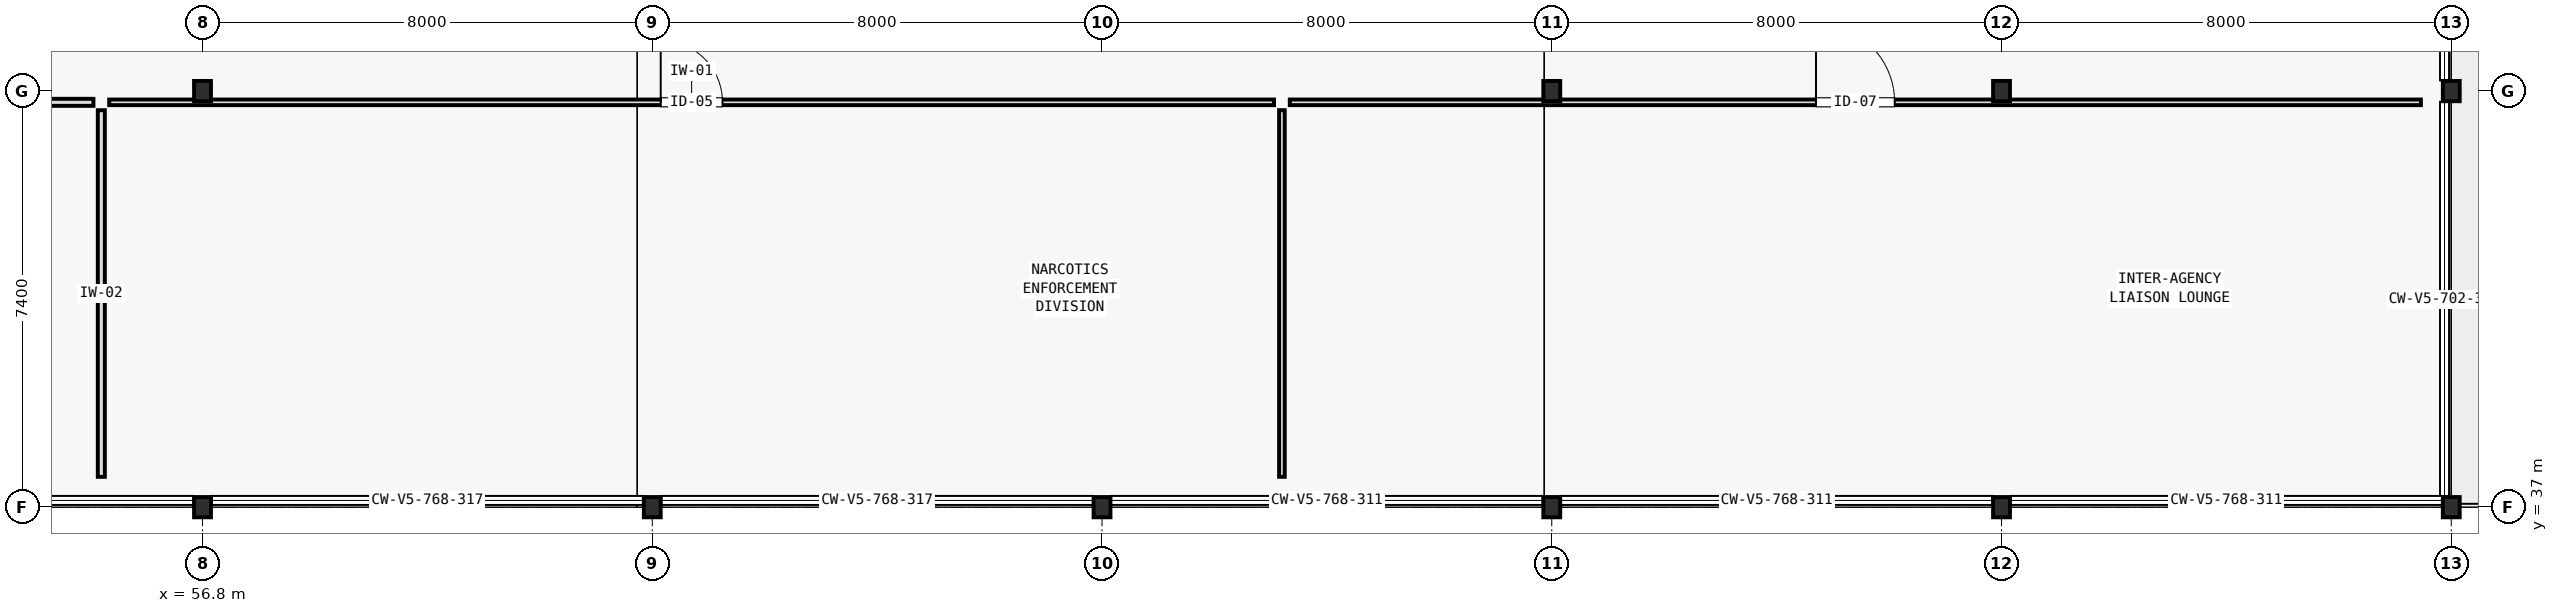
"""IFC4 building model, lengths in metres.
Left out: names, types, materials, properties, quantities, classifications, styles, units other than length and angle.
Written with IfcOpenShell. Run it as: python <this file> out.ifc"""

import sys

from ifc_helpers import new_model, si_unit, direction, frame, frame_2d, origin, origin_2d, place, context, subcontext, project, spatial, rectangle, i_section, extrude, element, fill, save


model = new_model("IFC4")
c1 = context("Model", 3, precision=1e-05, world=origin(), true_north=direction((0.0, 1.0)))
c2 = subcontext(c1, "Body", "Model", "MODEL_VIEW")
j1 = project(units=[si_unit("LENGTHUNIT", "METRE"), si_unit("PLANEANGLEUNIT", "RADIAN")], contexts=[c1])
p1 = place(None, origin())
s1 = spatial("IfcSite", under=j1, at=p1, CompositionType="ELEMENT")
p2 = place(p1, origin())
s2 = spatial("IfcBuilding", under=s1, at=p2, CompositionType="ELEMENT")
p3 = place(p2, frame((0.0, 0.0, 23.3)))
s3 = spatial("IfcBuildingStorey", under=s2, at=p3, CompositionType="ELEMENT", Elevation=23.3)
for number, where, z_axis, x_axis in (
    (1, (56.8, 37.0, 0.0), (0.0, 0.0, 1.0), (1.0, 0.0, 0.0)),
    (2, (56.8, 44.4, 0.0), (0.0, 0.0, 1.0), (1.0, 0.0, 0.0)),
    (3, (64.8, 37.0, 0.0), (0.0, 0.0, 1.0), (1.0, 0.0, 0.0)),
    (4, (72.8, 37.0, 0.0), (0.0, 0.0, 1.0), (1.0, 0.0, 0.0)),
    (5, (80.8, 37.0, 0.0), (0.0, 0.0, 1.0), (1.0, 0.0, 0.0)),
    (6, (80.8, 44.4, 0.0), (0.0, 0.0, 1.0), (1.0, 0.0, 0.0)),
    (7, (88.8, 37.0, 0.0), (0.0, 0.0, 1.0), (1.0, 0.0, 0.0)),
    (8, (88.8, 44.4, 0.0), (0.0, 0.0, 1.0), (1.0, 0.0, 0.0)),
    (9, (96.8, 37.0, 0.0), (0.0, 0.0, 1.0), (1.0, 0.0, 0.0)),
    (10, (96.8, 44.4, 0.0), (0.0, 0.0, 1.0), (1.0, 0.0, 0.0)),
):
    element("IfcColumn", number, at=place(p3, frame(where, z_axis=z_axis, x_axis=x_axis)), inside=s3, PredefinedType="COLUMN", context=c2, shape_type="SweptSolid", body=[
        extrude(i_section(OverallWidth=0.3, OverallDepth=0.36, WebThickness=0.012, FlangeThickness=0.022, FilletRadius=0.027, at=origin_2d()), origin(), (0.0, 0.0, 1.0), 3.9),
    ])
p4 = place(p3, frame((49.59, 44.2, 0.0), z_axis=(0.0, 0.0, 1.0), x_axis=(1.0, 0.0, 0.0)))
e11 = element("IfcWall", 11, at=p4, inside=s3, PredefinedType="PARTITIONING", context=c2, shape_type="SweptSolid", body=[
    extrude(rectangle(XDim=5.27, YDim=0.125, at=frame_2d((2.635, 0.0))), origin(), (0.0, 0.0, 1.0), 3.39),
])
p5 = place(p4, frame((2.11, 0.0, 0.0)))
e12 = element("IfcOpeningElement", 12, at=p5, cuts=e11, PredefinedType="OPENING", context=c2, shape_type="SweptSolid", body=[
    extrude(rectangle(XDim=1.05, YDim=2.1, at=frame_2d((0.525, 1.05))), frame((0.0, 0.073, 0.0), z_axis=(0.0, -1.0, 0.0), x_axis=(1.0, 0.0, 0.0)), (0.0, 0.0, 1.0), 0.145),
])
p6 = place(p3, frame((55.0, 37.54, 0.0), z_axis=(0.0, 0.0, 1.0), x_axis=(0.0, 1.0, 0.0)))
e13 = element("IfcWall", 13, at=p6, inside=s3, PredefinedType="PARTITIONING", context=c2, shape_type="SweptSolid", body=[
    extrude(rectangle(XDim=6.52, YDim=0.125, at=frame_2d((3.26, 0.0))), origin(), (0.0, 0.0, 1.0), 3.57),
])
p7 = place(p3, frame((55.14, 44.2, 0.0), z_axis=(0.0, 0.0, 1.0), x_axis=(1.0, 0.0, 0.0)))
e14 = element("IfcWall", 14, at=p7, inside=s3, PredefinedType="PARTITIONING", context=c2, shape_type="SweptSolid", body=[
    extrude(rectangle(XDim=20.72, YDim=0.1, at=frame_2d((10.36, 0.0))), origin(), (0.0, 0.0, 1.0), 3.21),
])
p8 = place(p7, frame((9.81, 0.0, 0.0)))
e15 = element("IfcOpeningElement", 15, at=p8, cuts=e14, PredefinedType="OPENING", context=c2, shape_type="SweptSolid", body=[
    extrude(rectangle(XDim=1.1, YDim=2.2, at=frame_2d((0.55, 1.1))), frame((0.0, 0.06, 0.0), z_axis=(0.0, -1.0, 0.0), x_axis=(1.0, 0.0, 0.0)), (0.0, 0.0, 1.0), 0.12),
])
p9 = place(p3, frame((76.0, 37.54, 0.0), z_axis=(0.0, 0.0, 1.0), x_axis=(0.0, 1.0, 0.0)))
e16 = element("IfcWall", 16, at=p9, inside=s3, PredefinedType="PARTITIONING", context=c2, shape_type="SweptSolid", body=[
    extrude(rectangle(XDim=6.52, YDim=0.1, at=frame_2d((3.26, 0.0))), origin(), (0.0, 0.0, 1.0), 3.57),
])
p10 = place(p3, frame((76.14, 44.2, 0.0), z_axis=(0.0, 0.0, 1.0), x_axis=(1.0, 0.0, 0.0)))
e17 = element("IfcWall", 17, at=p10, inside=s3, PredefinedType="PARTITIONING", context=c2, shape_type="SweptSolid", body=[
    extrude(rectangle(XDim=20.12, YDim=0.1, at=frame_2d((10.06, 0.0))), origin(), (0.0, 0.0, 1.0), 3.1),
])
p11 = place(p10, frame((9.36, 0.0, 0.0)))
e18 = element("IfcOpeningElement", 18, at=p11, cuts=e17, PredefinedType="OPENING", context=c2, shape_type="SweptSolid", body=[
    extrude(rectangle(XDim=1.4, YDim=2.2, at=frame_2d((0.7, 1.1))), frame((0.0, 0.06, 0.0), z_axis=(0.0, -1.0, 0.0), x_axis=(1.0, 0.0, 0.0)), (0.0, 0.0, 1.0), 0.12),
])
p12 = place(p8, origin())
e19 = element("IfcDoor", 19, at=p12, inside=s3, OperationType="SINGLE_SWING_LEFT", PredefinedType="DOOR", context=c2, shape_type="SweptSolid", body=[
    extrude(rectangle(XDim=1.1, YDim=2.2, at=frame_2d((0.55, 1.1))), frame((0.0, 0.025, 0.0), z_axis=(0.0, -1.0, 0.0), x_axis=(1.0, 0.0, 0.0)), (0.0, 0.0, 1.0), 0.05),
])
fill(e15, e19)
p13 = place(p11, origin())
e20 = element("IfcDoor", 20, at=p13, inside=s3, OperationType="SINGLE_SWING_LEFT", PredefinedType="DOOR", context=c2, shape_type="SweptSolid", body=[
    extrude(rectangle(XDim=1.4, YDim=2.2, at=frame_2d((0.7, 1.1))), frame((0.0, 0.025, 0.0), z_axis=(0.0, -1.0, 0.0), x_axis=(1.0, 0.0, 0.0)), (0.0, 0.0, 1.0), 0.05),
])
fill(e18, e20)
save(model, sys.argv[1])
